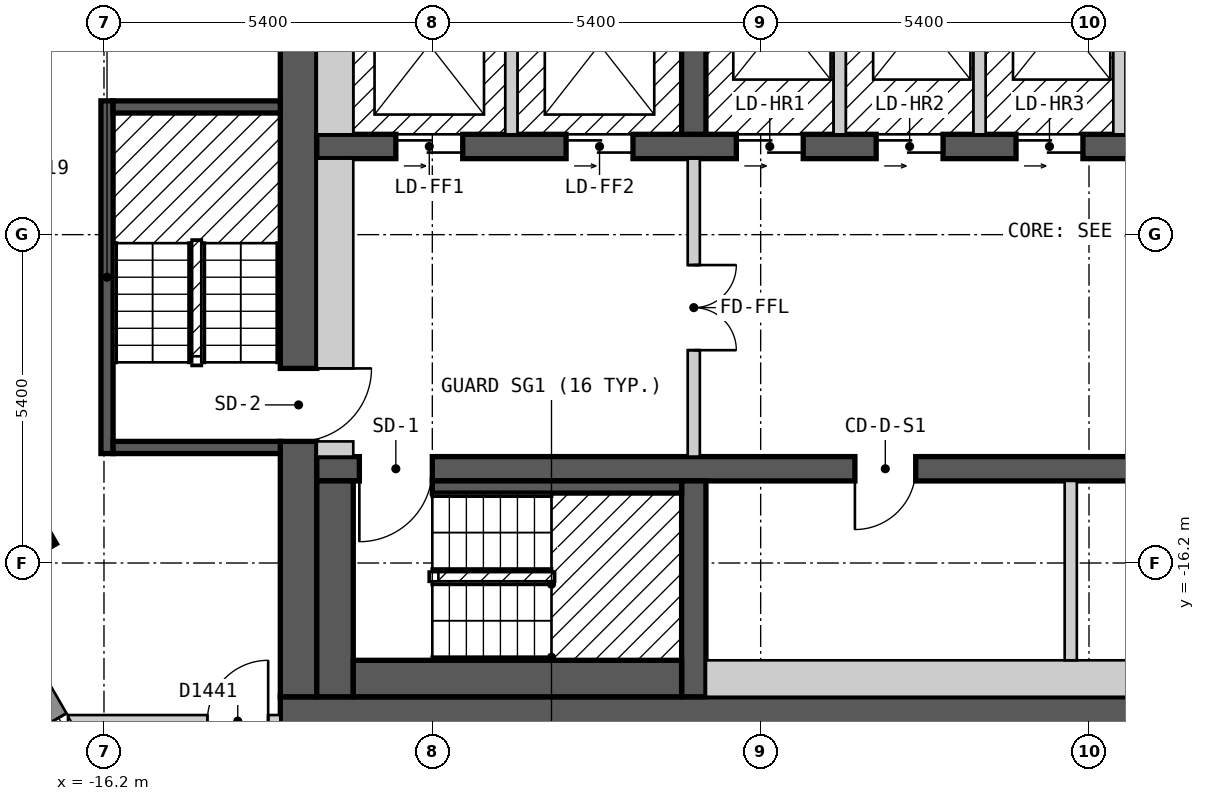
"""IFC4 building model, lengths in metres.
Left out: names, types, materials, properties, quantities, classifications, styles, units other than length and angle.
Written with IfcOpenShell. Run it as: python <this file> out.ifc"""

import sys

from ifc_helpers import new_model, si_unit, direction, frame, frame_2d, origin, origin_2d, place, context, subcontext, project, spatial, polyline, rectangle, outline, extrude, element, fill, save


model = new_model("IFC4")
c1 = context("Model", 3, precision=1e-05, world=origin(), true_north=direction((0.0, 1.0)))
c2 = subcontext(c1, "Body", "Model", "MODEL_VIEW")
j1 = project(units=[si_unit("LENGTHUNIT", "METRE"), si_unit("PLANEANGLEUNIT", "RADIAN")], contexts=[c1])
p1 = place(None, origin())
s1 = spatial("IfcSite", under=j1, at=p1, CompositionType="ELEMENT")
p2 = place(p1, origin())
s2 = spatial("IfcBuilding", under=s1, at=p2, CompositionType="ELEMENT")
p3 = place(p2, frame((0.0, 0.0, 178.2)))
s3 = spatial("IfcBuildingStorey", under=s2, at=p3, CompositionType="ELEMENT", Elevation=178.2)
p4 = place(p3, frame((-17.53, -15.736, 0.0), z_axis=(0.0, 0.0, 1.0), x_axis=(0.5, -0.866025403784, 0.0)))
e1 = element("IfcColumn", 1, at=p4, inside=s3, PredefinedType="COLUMN", context=c2, shape_type="SweptSolid", body=[
    extrude(rectangle(XDim=0.8, YDim=0.8, at=origin_2d()), origin(), (0.0, 0.0, 1.0), 3.0),
])
p5 = place(p3, frame((-13.3, -18.7, 0.0), z_axis=(0.0, 0.0, 1.0), x_axis=(1.0, 0.0, 0.0)))
e2 = element("IfcWall", 2, at=p5, inside=s3, PredefinedType="SHEAR", context=c2, shape_type="SweptSolid", body=[
    extrude(rectangle(XDim=26.6, YDim=0.6, at=frame_2d((13.3, 0.0))), origin(), (0.0, 0.0, 1.0), 2.7),
])
p6 = place(p3, frame((-13.0, -18.4, 0.0), z_axis=(0.0, 0.0, 1.0), x_axis=(0.0, 1.0, 0.0)))
e3 = element("IfcWall", 3, at=p6, inside=s3, PredefinedType="SHEAR", context=c2, shape_type="SweptSolid", body=[
    extrude(rectangle(XDim=12.8, YDim=0.6, at=frame_2d((6.4, 0.0))), origin(), (0.0, 0.0, 1.0), 2.7),
])
p7 = place(p6, frame((4.2, 0.0, 0.0)))
e4 = element("IfcOpeningElement", 4, at=p7, cuts=e3, PredefinedType="OPENING", context=c2, shape_type="SweptSolid", body=[
    extrude(rectangle(XDim=1.2, YDim=2.1, at=frame_2d((0.6, 1.05))), frame((0.0, 0.31, 0.0), z_axis=(0.0, -1.0, 0.0), x_axis=(1.0, 0.0, 0.0)), (0.0, 0.0, 1.0), 0.62),
])
p8 = place(p3, frame((-12.7, -14.65, 0.0), z_axis=(0.0, 0.0, 1.0), x_axis=(1.0, 0.0, 0.0)))
e5 = element("IfcWall", 5, at=p8, inside=s3, PredefinedType="SHEAR", context=c2, shape_type="SweptSolid", body=[
    extrude(rectangle(XDim=25.4, YDim=0.4, at=frame_2d((12.7, 0.0))), origin(), (0.0, 0.0, 1.0), 2.7),
])
p9 = place(p8, frame((1.9, 0.0, 0.0), z_axis=(0.0, 0.0, 1.0), x_axis=(-1.0, 0.0, 0.0)))
e6 = element("IfcOpeningElement", 6, at=p9, cuts=e5, PredefinedType="OPENING", context=c2, shape_type="SweptSolid", body=[
    extrude(rectangle(XDim=1.2, YDim=2.1, at=frame_2d((0.6, 1.05))), frame((0.0, 0.21, 0.0), z_axis=(0.0, -1.0, 0.0), x_axis=(1.0, 0.0, 0.0)), (0.0, 0.0, 1.0), 0.42),
])
p10 = place(p8, frame((24.75, 0.0, 0.0), z_axis=(0.0, 0.0, 1.0), x_axis=(-1.0, 0.0, 0.0)))
e7 = element("IfcOpeningElement", 7, at=p10, cuts=e5, PredefinedType="OPENING", context=c2, shape_type="SweptSolid", body=[
    extrude(rectangle(XDim=1.2, YDim=2.1, at=frame_2d((0.6, 1.05))), frame((0.0, 0.21, 0.0), z_axis=(0.0, -1.0, 0.0), x_axis=(1.0, 0.0, 0.0)), (0.0, 0.0, 1.0), 0.42),
])
p11 = place(p8, frame((9.85, 0.0, 0.0), z_axis=(0.0, 0.0, 1.0), x_axis=(-1.0, 0.0, 0.0)))
e8 = element("IfcOpeningElement", 8, at=p11, cuts=e5, PredefinedType="OPENING", context=c2, shape_type="SweptSolid", body=[
    extrude(rectangle(XDim=1.0, YDim=2.1, at=frame_2d((0.5, 1.05))), frame((0.0, 0.21, 0.0), z_axis=(0.0, -1.0, 0.0), x_axis=(1.0, 0.0, 0.0)), (0.0, 0.0, 1.0), 0.42),
])
p12 = place(p8, frame((16.25, 0.0, 0.0), z_axis=(0.0, 0.0, 1.0), x_axis=(-1.0, 0.0, 0.0)))
e9 = element("IfcOpeningElement", 9, at=p12, cuts=e5, PredefinedType="OPENING", context=c2, shape_type="SweptSolid", body=[
    extrude(rectangle(XDim=1.0, YDim=2.1, at=frame_2d((0.5, 1.05))), frame((0.0, 0.21, 0.0), z_axis=(0.0, -1.0, 0.0), x_axis=(1.0, 0.0, 0.0)), (0.0, 0.0, 1.0), 0.42),
])
p13 = place(p3, frame((-12.7, -9.35, 0.0), z_axis=(0.0, 0.0, 1.0), x_axis=(1.0, 0.0, 0.0)))
e10 = element("IfcWall", 10, at=p13, inside=s3, PredefinedType="SHEAR", context=c2, shape_type="SweptSolid", body=[
    extrude(rectangle(XDim=22.9, YDim=0.4, at=frame_2d((11.45, 0.0))), origin(), (0.0, 0.0, 1.0), 2.7),
])
p14 = place(p13, frame((1.3, 0.0, 0.0)))
e11 = element("IfcOpeningElement", 11, at=p14, cuts=e10, PredefinedType="OPENING", context=c2, shape_type="SweptSolid", body=[
    extrude(rectangle(XDim=1.1, YDim=2.1, at=frame_2d((0.55, 1.05))), frame((0.0, 0.21, 0.0), z_axis=(0.0, -1.0, 0.0), x_axis=(1.0, 0.0, 0.0)), (0.0, 0.0, 1.0), 0.42),
])
p15 = place(p13, frame((4.1, 0.0, 0.0)))
e12 = element("IfcOpeningElement", 12, at=p15, cuts=e10, PredefinedType="OPENING", context=c2, shape_type="SweptSolid", body=[
    extrude(rectangle(XDim=1.1, YDim=2.1, at=frame_2d((0.55, 1.05))), frame((0.0, 0.21, 0.0), z_axis=(0.0, -1.0, 0.0), x_axis=(1.0, 0.0, 0.0)), (0.0, 0.0, 1.0), 0.42),
])
p16 = place(p13, frame((6.9, 0.0, 0.0)))
e13 = element("IfcOpeningElement", 13, at=p16, cuts=e10, PredefinedType="OPENING", context=c2, shape_type="SweptSolid", body=[
    extrude(rectangle(XDim=1.1, YDim=2.1, at=frame_2d((0.55, 1.05))), frame((0.0, 0.21, 0.0), z_axis=(0.0, -1.0, 0.0), x_axis=(1.0, 0.0, 0.0)), (0.0, 0.0, 1.0), 0.42),
])
p17 = place(p13, frame((9.2, 0.0, 0.0)))
e14 = element("IfcOpeningElement", 14, at=p17, cuts=e10, PredefinedType="OPENING", context=c2, shape_type="SweptSolid", body=[
    extrude(rectangle(XDim=1.1, YDim=2.1, at=frame_2d((0.55, 1.05))), frame((0.0, 0.21, 0.0), z_axis=(0.0, -1.0, 0.0), x_axis=(1.0, 0.0, 0.0)), (0.0, 0.0, 1.0), 0.42),
])
p18 = place(p13, frame((11.5, 0.0, 0.0)))
e15 = element("IfcOpeningElement", 15, at=p18, cuts=e10, PredefinedType="OPENING", context=c2, shape_type="SweptSolid", body=[
    extrude(rectangle(XDim=1.1, YDim=2.1, at=frame_2d((0.55, 1.05))), frame((0.0, 0.21, 0.0), z_axis=(0.0, -1.0, 0.0), x_axis=(1.0, 0.0, 0.0)), (0.0, 0.0, 1.0), 0.42),
])
p19 = place(p13, frame((13.8, 0.0, 0.0)))
e16 = element("IfcOpeningElement", 16, at=p19, cuts=e10, PredefinedType="OPENING", context=c2, shape_type="SweptSolid", body=[
    extrude(rectangle(XDim=1.1, YDim=2.1, at=frame_2d((0.55, 1.05))), frame((0.0, 0.21, 0.0), z_axis=(0.0, -1.0, 0.0), x_axis=(1.0, 0.0, 0.0)), (0.0, 0.0, 1.0), 0.42),
])
p20 = place(p13, frame((16.1, 0.0, 0.0)))
e17 = element("IfcOpeningElement", 17, at=p20, cuts=e10, PredefinedType="OPENING", context=c2, shape_type="SweptSolid", body=[
    extrude(rectangle(XDim=1.1, YDim=2.1, at=frame_2d((0.55, 1.05))), frame((0.0, 0.21, 0.0), z_axis=(0.0, -1.0, 0.0), x_axis=(1.0, 0.0, 0.0)), (0.0, 0.0, 1.0), 0.42),
])
p21 = place(p13, frame((18.4, 0.0, 0.0)))
e18 = element("IfcOpeningElement", 18, at=p21, cuts=e10, PredefinedType="OPENING", context=c2, shape_type="SweptSolid", body=[
    extrude(rectangle(XDim=1.1, YDim=2.1, at=frame_2d((0.55, 1.05))), frame((0.0, 0.21, 0.0), z_axis=(0.0, -1.0, 0.0), x_axis=(1.0, 0.0, 0.0)), (0.0, 0.0, 1.0), 0.42),
])
p22 = place(p13, frame((20.8, 0.0, 0.0)))
e19 = element("IfcOpeningElement", 19, at=p22, cuts=e10, PredefinedType="OPENING", context=c2, shape_type="SweptSolid", body=[
    extrude(rectangle(XDim=1.1, YDim=2.1, at=frame_2d((0.55, 1.05))), frame((0.0, 0.21, 0.0), z_axis=(0.0, -1.0, 0.0), x_axis=(1.0, 0.0, 0.0)), (0.0, 0.0, 1.0), 0.42),
])
for number, where, z_axis, x_axis in (
    (20, (-6.5, -18.4, 0.0), (0.0, 0.0, 1.0), (0.0, 1.0, 0.0)),
    (21, (-6.5, -9.15, 0.0), (0.0, 0.0, 1.0), (0.0, 1.0, 0.0)),
):
    element("IfcWall", number, at=place(p3, frame(where, z_axis=z_axis, x_axis=x_axis)), inside=s3, PredefinedType="SHEAR", context=c2, shape_type="SweptSolid", body=[
        extrude(rectangle(XDim=3.55, YDim=0.4, at=frame_2d((1.775, 0.0))), origin(), (0.0, 0.0, 1.0), 2.7),
    ])
p23 = place(p3, frame((-26.024, -3.025, 0.0), z_axis=(0.0, 0.0, 1.0), x_axis=(0.500018670445, -0.86601462413, 0.0)))
e22 = element("IfcWall", 22, at=p23, inside=s3, PredefinedType="SOLIDWALL", context=c2, shape_type="SweptSolid", body=[
    extrude(outline(polyline([(0.0, -0.15), (20.785, -0.15), (20.705, 0.15), (0.08, 0.15), (0.0, -0.15)])), origin(), (0.0, 0.0, 1.0), 2.7),
])
p24 = place(p23, frame((1.13, 0.0, 0.15)))
e23 = element("IfcOpeningElement", 23, at=p24, cuts=e22, PredefinedType="OPENING", context=c2, shape_type="SweptSolid", body=[
    extrude(rectangle(XDim=1.5, YDim=2.1, at=frame_2d((0.75, 1.05))), frame((0.0, 0.16, 0.0), z_axis=(0.0, -1.0, 0.0), x_axis=(1.0, 0.0, 0.0)), (0.0, 0.0, 1.0), 0.32),
])
p25 = place(p23, frame((3.562, 0.0, 0.15)))
e24 = element("IfcOpeningElement", 24, at=p25, cuts=e22, PredefinedType="OPENING", context=c2, shape_type="SweptSolid", body=[
    extrude(rectangle(XDim=1.5, YDim=2.1, at=frame_2d((0.75, 1.05))), frame((0.0, 0.16, 0.0), z_axis=(0.0, -1.0, 0.0), x_axis=(1.0, 0.0, 0.0)), (0.0, 0.0, 1.0), 0.32),
])
p26 = place(p23, frame((5.994, 0.0, 0.15)))
e25 = element("IfcOpeningElement", 25, at=p26, cuts=e22, PredefinedType="OPENING", context=c2, shape_type="SweptSolid", body=[
    extrude(rectangle(XDim=1.5, YDim=2.1, at=frame_2d((0.75, 1.05))), frame((0.0, 0.16, 0.0), z_axis=(0.0, -1.0, 0.0), x_axis=(1.0, 0.0, 0.0)), (0.0, 0.0, 1.0), 0.32),
])
p27 = place(p23, frame((8.425, 0.0, 0.15)))
e26 = element("IfcOpeningElement", 26, at=p27, cuts=e22, PredefinedType="OPENING", context=c2, shape_type="SweptSolid", body=[
    extrude(rectangle(XDim=1.5, YDim=2.1, at=frame_2d((0.75, 1.05))), frame((0.0, 0.16, 0.0), z_axis=(0.0, -1.0, 0.0), x_axis=(1.0, 0.0, 0.0)), (0.0, 0.0, 1.0), 0.32),
])
p28 = place(p23, frame((10.857, 0.0, 0.15)))
e27 = element("IfcOpeningElement", 27, at=p28, cuts=e22, PredefinedType="OPENING", context=c2, shape_type="SweptSolid", body=[
    extrude(rectangle(XDim=1.5, YDim=2.1, at=frame_2d((0.75, 1.05))), frame((0.0, 0.16, 0.0), z_axis=(0.0, -1.0, 0.0), x_axis=(1.0, 0.0, 0.0)), (0.0, 0.0, 1.0), 0.32),
])
p29 = place(p23, frame((13.289, 0.0, 0.15)))
e28 = element("IfcOpeningElement", 28, at=p29, cuts=e22, PredefinedType="OPENING", context=c2, shape_type="SweptSolid", body=[
    extrude(rectangle(XDim=1.5, YDim=2.1, at=frame_2d((0.75, 1.05))), frame((0.0, 0.16, 0.0), z_axis=(0.0, -1.0, 0.0), x_axis=(1.0, 0.0, 0.0)), (0.0, 0.0, 1.0), 0.32),
])
p30 = place(p23, frame((15.722, 0.0, 0.15)))
e29 = element("IfcOpeningElement", 29, at=p30, cuts=e22, PredefinedType="OPENING", context=c2, shape_type="SweptSolid", body=[
    extrude(rectangle(XDim=1.5, YDim=2.1, at=frame_2d((0.75, 1.05))), frame((0.0, 0.16, 0.0), z_axis=(0.0, -1.0, 0.0), x_axis=(1.0, 0.0, 0.0)), (0.0, 0.0, 1.0), 0.32),
])
p31 = place(p23, frame((18.154, 0.0, 0.15)))
e30 = element("IfcOpeningElement", 30, at=p31, cuts=e22, PredefinedType="OPENING", context=c2, shape_type="SweptSolid", body=[
    extrude(rectangle(XDim=1.5, YDim=2.1, at=frame_2d((0.75, 1.05))), frame((0.0, 0.16, 0.0), z_axis=(0.0, -1.0, 0.0), x_axis=(1.0, 0.0, 0.0)), (0.0, 0.0, 1.0), 0.32),
])
p32 = place(p3, frame((-23.13, -7.737, 0.0), z_axis=(0.0, 0.0, 1.0), x_axis=(0.86598451299, 0.500070818246, 0.0)))
e31 = element("IfcWall", 31, at=p32, inside=s3, PredefinedType="PARTITIONING", context=c2, shape_type="SweptSolid", body=[
    extrude(rectangle(XDim=8.695, YDim=0.2, at=frame_2d((4.348, 0.0))), origin(), (0.0, 0.0, 1.0), 2.7),
])
p33 = place(p3, frame((-16.792, -18.8, 0.0), z_axis=(0.0, 0.0, 1.0), x_axis=(1.0, 0.0, 0.0)))
e32 = element("IfcWall", 32, at=p33, inside=s3, PredefinedType="PARTITIONING", context=c2, shape_type="SweptSolid", body=[
    extrude(rectangle(XDim=3.492, YDim=0.2, at=frame_2d((1.746, 0.0))), origin(), (0.0, 0.0, 1.0), 2.7),
])
p34 = place(p33, frame((2.292, 0.0, 0.0)))
e33 = element("IfcOpeningElement", 33, at=p34, cuts=e32, PredefinedType="OPENING", context=c2, shape_type="SweptSolid", body=[
    extrude(rectangle(XDim=1.0, YDim=2.1, at=frame_2d((0.5, 1.05))), frame((0.0, 0.11, 0.0), z_axis=(0.0, -1.0, 0.0), x_axis=(1.0, 0.0, 0.0)), (0.0, 0.0, 1.0), 0.22),
])
p35 = place(p3, frame((-16.15, -14.4, 0.0), z_axis=(0.0, 0.0, 1.0), x_axis=(0.0, 1.0, 0.0)))
e34 = element("IfcWall", 34, at=p35, inside=s3, PredefinedType="SOLIDWALL", context=c2, shape_type="SweptSolid", body=[
    extrude(rectangle(XDim=5.8, YDim=0.2, at=frame_2d((2.9, 0.0))), origin(), (0.0, 0.0, 1.0), 2.7),
])
for number, where, z_axis, x_axis in (
    (35, (-16.05, -14.3, 0.0), (0.0, 0.0, 1.0), (1.0, 0.0, 0.0)),
    (36, (-16.05, -8.7, 0.0), (0.0, 0.0, 1.0), (1.0, 0.0, 0.0)),
):
    element("IfcWall", number, at=place(p3, frame(where, z_axis=z_axis, x_axis=x_axis)), inside=s3, PredefinedType="SOLIDWALL", context=c2, shape_type="SweptSolid", body=[
        extrude(rectangle(XDim=2.75, YDim=0.2, at=frame_2d((1.375, 0.0))), origin(), (0.0, 0.0, 1.0), 2.7),
    ])
p36 = place(p3, frame((-12.4, -18.4, 0.0), z_axis=(0.0, 0.0, 1.0), x_axis=(0.0, 1.0, 0.0)))
e37 = element("IfcWall", 37, at=p36, inside=s3, PredefinedType="SOLIDWALL", context=c2, shape_type="SweptSolid", body=[
    extrude(rectangle(XDim=3.55, YDim=0.6, at=frame_2d((1.775, 0.0))), origin(), (0.0, 0.0, 1.0), 2.7),
])
p37 = place(p3, frame((-12.7, -14.325, 0.0), z_axis=(0.0, 0.0, 1.0), x_axis=(1.0, 0.0, 0.0)))
e38 = element("IfcWall", 38, at=p37, inside=s3, PredefinedType="PARTITIONING", context=c2, shape_type="SweptSolid", body=[
    extrude(rectangle(XDim=0.6, YDim=0.25, at=frame_2d((0.3, 0.0))), origin(), (0.0, 0.0, 1.0), 2.7),
])
p38 = place(p3, frame((-12.4, -13.0, 0.0), z_axis=(0.0, 0.0, 1.0), x_axis=(0.0, 1.0, 0.0)))
e39 = element("IfcWall", 39, at=p38, inside=s3, PredefinedType="PARTITIONING", context=c2, shape_type="SweptSolid", body=[
    extrude(rectangle(XDim=3.45, YDim=0.6, at=frame_2d((1.725, 0.0))), origin(), (0.0, 0.0, 1.0), 2.7),
])
p39 = place(p3, frame((-12.4, -9.15, 0.0), z_axis=(0.0, 0.0, 1.0), x_axis=(0.0, 1.0, 0.0)))
e40 = element("IfcWall", 40, at=p39, inside=s3, PredefinedType="SOLIDWALL", context=c2, shape_type="SweptSolid", body=[
    extrude(rectangle(XDim=3.55, YDim=0.6, at=frame_2d((1.775, 0.0))), origin(), (0.0, 0.0, 1.0), 2.7),
])
p40 = place(p3, frame((-12.1, -18.1, 0.0), z_axis=(0.0, 0.0, 1.0), x_axis=(1.0, 0.0, 0.0)))
e41 = element("IfcWall", 41, at=p40, inside=s3, PredefinedType="SOLIDWALL", context=c2, shape_type="SweptSolid", body=[
    extrude(rectangle(XDim=5.4, YDim=0.6, at=frame_2d((2.7, 0.0))), origin(), (0.0, 0.0, 1.0), 2.7),
])
p41 = place(p3, frame((-10.8, -14.95, 0.0), z_axis=(0.0, 0.0, 1.0), x_axis=(1.0, 0.0, 0.0)))
e42 = element("IfcWall", 42, at=p41, inside=s3, PredefinedType="SOLIDWALL", context=c2, shape_type="SweptSolid", body=[
    extrude(rectangle(XDim=4.1, YDim=0.2, at=frame_2d((2.05, 0.0))), origin(), (0.0, 0.0, 1.0), 2.7),
])
p42 = place(p3, frame((-9.5, -9.15, 0.0), z_axis=(0.0, 0.0, 1.0), x_axis=(0.0, 1.0, 0.0)))
e43 = element("IfcWall", 43, at=p42, inside=s3, PredefinedType="SOLIDWALL", context=c2, shape_type="SweptSolid", body=[
    extrude(rectangle(XDim=2.95, YDim=0.2, at=frame_2d((1.475, 0.0))), origin(), (0.0, 0.0, 1.0), 2.7),
])
p43 = place(p3, frame((-6.5, -14.45, 0.0), z_axis=(0.0, 0.0, 1.0), x_axis=(0.0, 1.0, 0.0)))
e44 = element("IfcWall", 44, at=p43, inside=s3, PredefinedType="PARTITIONING", context=c2, shape_type="SweptSolid", body=[
    extrude(rectangle(XDim=4.9, YDim=0.2, at=frame_2d((2.45, 0.0))), origin(), (0.0, 0.0, 1.0), 2.7),
])
p44 = place(p43, frame((3.15, 0.0, 0.0), z_axis=(0.0, 0.0, 1.0), x_axis=(-1.0, 0.0, 0.0)))
e45 = element("IfcOpeningElement", 45, at=p44, cuts=e44, PredefinedType="OPENING", context=c2, shape_type="SweptSolid", body=[
    extrude(rectangle(XDim=1.4, YDim=2.1, at=frame_2d((0.7, 1.05))), frame((0.0, 0.11, 0.0), z_axis=(0.0, -1.0, 0.0), x_axis=(1.0, 0.0, 0.0)), (0.0, 0.0, 1.0), 0.22),
])
p45 = place(p3, frame((-6.3, -18.1, 0.0), z_axis=(0.0, 0.0, 1.0), x_axis=(1.0, 0.0, 0.0)))
e46 = element("IfcWall", 46, at=p45, inside=s3, PredefinedType="PARTITIONING", context=c2, shape_type="SweptSolid", body=[
    extrude(rectangle(XDim=12.6, YDim=0.6, at=frame_2d((6.3, 0.0))), origin(), (0.0, 0.0, 1.0), 2.7),
])
for number, where, z_axis, x_axis in (
    (47, (-4.1, -9.15, 0.0), (0.0, 0.0, 1.0), (0.0, 1.0, 0.0)),
    (48, (-1.8, -9.15, 0.0), (0.0, 0.0, 1.0), (0.0, 1.0, 0.0)),
):
    element("IfcWall", number, at=place(p3, frame(where, z_axis=z_axis, x_axis=x_axis)), inside=s3, PredefinedType="SOLIDWALL", context=c2, shape_type="SweptSolid", body=[
        extrude(rectangle(XDim=2.95, YDim=0.2, at=frame_2d((1.475, 0.0))), origin(), (0.0, 0.0, 1.0), 2.7),
    ])
p46 = place(p3, frame((-0.3, -17.8, 0.0), z_axis=(0.0, 0.0, 1.0), x_axis=(0.0, 1.0, 0.0)))
e49 = element("IfcWall", 49, at=p46, inside=s3, PredefinedType="PARTITIONING", context=c2, shape_type="SweptSolid", body=[
    extrude(rectangle(XDim=2.95, YDim=0.2, at=frame_2d((1.475, 0.0))), origin(), (0.0, 0.0, 1.0), 2.7),
])
p47 = place(p3, frame((0.5, -9.15, 0.0), z_axis=(0.0, 0.0, 1.0), x_axis=(0.0, 1.0, 0.0)))
e50 = element("IfcWall", 50, at=p47, inside=s3, PredefinedType="SOLIDWALL", context=c2, shape_type="SweptSolid", body=[
    extrude(rectangle(XDim=2.95, YDim=0.2, at=frame_2d((1.475, 0.0))), origin(), (0.0, 0.0, 1.0), 2.7),
])
p48 = place(p31, origin())
e51 = element("IfcWindow", 51, at=p48, inside=s3, PartitioningType="SINGLE_PANEL", PredefinedType="WINDOW", context=c2, shape_type="SweptSolid", body=[
    extrude(rectangle(XDim=1.5, YDim=2.1, at=frame_2d((0.75, 1.05))), frame((0.0, 0.03, 0.0), z_axis=(0.0, -1.0, 0.0), x_axis=(1.0, 0.0, 0.0)), (0.0, 0.0, 1.0), 0.06),
])
fill(e30, e51)
p49 = place(p34, origin())
e52 = element("IfcDoor", 52, at=p49, inside=s3, OperationType="SINGLE_SWING_RIGHT", PredefinedType="DOOR", context=c2, shape_type="SweptSolid", body=[
    extrude(rectangle(XDim=1.0, YDim=2.1, at=frame_2d((0.5, 1.05))), frame((0.0, 0.025, 0.0), z_axis=(0.0, -1.0, 0.0), x_axis=(1.0, 0.0, 0.0)), (0.0, 0.0, 1.0), 0.05),
])
fill(e33, e52)
p50 = place(p14, origin())
e53 = element("IfcDoor", 53, at=p50, inside=s3, OperationType="DOUBLE_DOOR_SLIDING", PredefinedType="DOOR", context=c2, shape_type="SweptSolid", body=[
    extrude(rectangle(XDim=1.1, YDim=2.1, at=frame_2d((0.55, 1.05))), frame((0.0, 0.025, 0.0), z_axis=(0.0, -1.0, 0.0), x_axis=(1.0, 0.0, 0.0)), (0.0, 0.0, 1.0), 0.05),
])
fill(e11, e53)
p51 = place(p15, origin())
e54 = element("IfcDoor", 54, at=p51, inside=s3, OperationType="DOUBLE_DOOR_SLIDING", PredefinedType="DOOR", context=c2, shape_type="SweptSolid", body=[
    extrude(rectangle(XDim=1.1, YDim=2.1, at=frame_2d((0.55, 1.05))), frame((0.0, 0.025, 0.0), z_axis=(0.0, -1.0, 0.0), x_axis=(1.0, 0.0, 0.0)), (0.0, 0.0, 1.0), 0.05),
])
fill(e12, e54)
p52 = place(p16, origin())
e55 = element("IfcDoor", 55, at=p52, inside=s3, OperationType="DOUBLE_DOOR_SLIDING", PredefinedType="DOOR", context=c2, shape_type="SweptSolid", body=[
    extrude(rectangle(XDim=1.1, YDim=2.1, at=frame_2d((0.55, 1.05))), frame((0.0, 0.025, 0.0), z_axis=(0.0, -1.0, 0.0), x_axis=(1.0, 0.0, 0.0)), (0.0, 0.0, 1.0), 0.05),
])
fill(e13, e55)
p53 = place(p17, origin())
e56 = element("IfcDoor", 56, at=p53, inside=s3, OperationType="DOUBLE_DOOR_SLIDING", PredefinedType="DOOR", context=c2, shape_type="SweptSolid", body=[
    extrude(rectangle(XDim=1.1, YDim=2.1, at=frame_2d((0.55, 1.05))), frame((0.0, 0.025, 0.0), z_axis=(0.0, -1.0, 0.0), x_axis=(1.0, 0.0, 0.0)), (0.0, 0.0, 1.0), 0.05),
])
fill(e14, e56)
p54 = place(p18, origin())
e57 = element("IfcDoor", 57, at=p54, inside=s3, OperationType="DOUBLE_DOOR_SLIDING", PredefinedType="DOOR", context=c2, shape_type="SweptSolid", body=[
    extrude(rectangle(XDim=1.1, YDim=2.1, at=frame_2d((0.55, 1.05))), frame((0.0, 0.025, 0.0), z_axis=(0.0, -1.0, 0.0), x_axis=(1.0, 0.0, 0.0)), (0.0, 0.0, 1.0), 0.05),
])
fill(e15, e57)
p55 = place(p9, origin())
e58 = element("IfcDoor", 58, at=p55, inside=s3, OperationType="SINGLE_SWING_RIGHT", PredefinedType="DOOR", context=c2, shape_type="SweptSolid", body=[
    extrude(rectangle(XDim=1.2, YDim=2.1, at=frame_2d((0.6, 1.05))), frame((0.0, 0.025, 0.0), z_axis=(0.0, -1.0, 0.0), x_axis=(1.0, 0.0, 0.0)), (0.0, 0.0, 1.0), 0.05),
])
fill(e6, e58)
p56 = place(p7, origin())
e59 = element("IfcDoor", 59, at=p56, inside=s3, OperationType="SINGLE_SWING_RIGHT", PredefinedType="DOOR", context=c2, shape_type="SweptSolid", body=[
    extrude(rectangle(XDim=1.2, YDim=2.1, at=frame_2d((0.6, 1.05))), frame((0.0, 0.025, 0.0), z_axis=(0.0, -1.0, 0.0), x_axis=(1.0, 0.0, 0.0)), (0.0, 0.0, 1.0), 0.05),
])
fill(e4, e59)
p57 = place(p44, origin())
e60 = element("IfcDoor", 60, at=p57, inside=s3, OperationType="DOUBLE_DOOR_SINGLE_SWING", PredefinedType="DOOR", context=c2, shape_type="SweptSolid", body=[
    extrude(rectangle(XDim=1.4, YDim=2.1, at=frame_2d((0.7, 1.05))), frame((0.0, 0.025, 0.0), z_axis=(0.0, -1.0, 0.0), x_axis=(1.0, 0.0, 0.0)), (0.0, 0.0, 1.0), 0.05),
])
fill(e45, e60)
p58 = place(p11, origin())
e61 = element("IfcDoor", 61, at=p58, inside=s3, OperationType="SINGLE_SWING_RIGHT", PredefinedType="DOOR", context=c2, shape_type="SweptSolid", body=[
    extrude(rectangle(XDim=1.0, YDim=2.1, at=frame_2d((0.5, 1.05))), frame((0.0, 0.025, 0.0), z_axis=(0.0, -1.0, 0.0), x_axis=(1.0, 0.0, 0.0)), (0.0, 0.0, 1.0), 0.05),
])
fill(e8, e61)
save(model, sys.argv[1])
